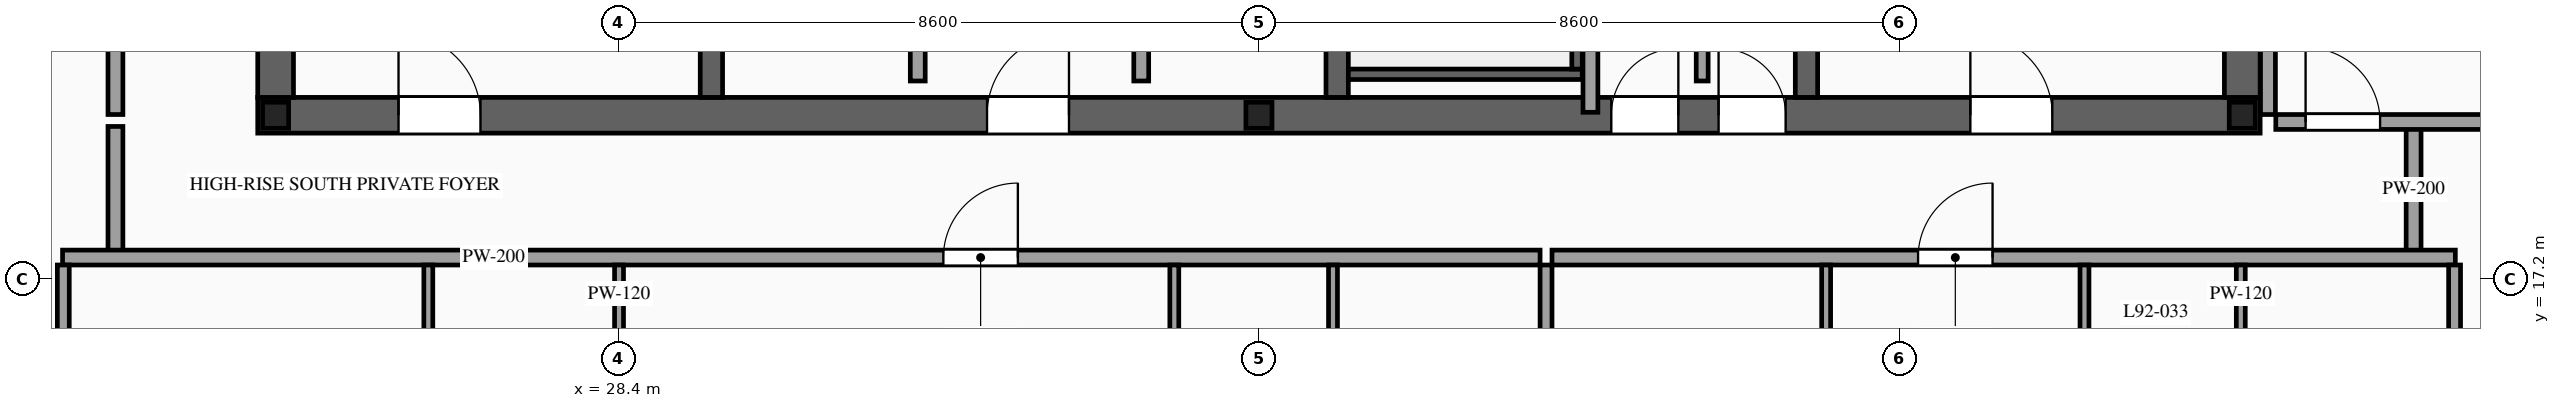
"""IFC4 building model, lengths in metres.
Left out: names, types, materials, properties, quantities, classifications, styles, units other than length and angle.
Written with IfcOpenShell. Run it as: python <this file> out.ifc"""

import sys

from ifc_helpers import new_model, si_unit, direction, frame, frame_2d, origin, origin_2d, place, context, subcontext, project, spatial, rectangle, i_section, extrude, source, transform, mapped, element, fill, save


model = new_model("IFC4")
c1 = context("Model", 3, precision=1e-05, world=origin(), true_north=direction((0.0, 1.0)))
c2 = subcontext(c1, "Body", "Model", "MODEL_VIEW")
j1 = project(units=[si_unit("LENGTHUNIT", "METRE"), si_unit("PLANEANGLEUNIT", "RADIAN")], contexts=[c1])
p1 = place(None, origin())
s1 = spatial("IfcSite", under=j1, at=p1, CompositionType="ELEMENT")
p2 = place(p1, origin())
s2 = spatial("IfcBuilding", under=s1, at=p2, CompositionType="ELEMENT")
p3 = place(p2, frame((0.0, 0.0, 343.2)))
s3 = spatial("IfcBuildingStorey", under=s2, at=p3, CompositionType="ELEMENT", Elevation=343.2)
p4 = place(p3, frame((23.56, 19.4, 0.0), z_axis=(0.0, 0.0, 1.0), x_axis=(1.0, 0.0, 0.0)))
e1 = element("IfcWall", 1, at=p4, inside=s3, PredefinedType="SHEAR", context=c2, shape_type="SweptSolid", body=[
    extrude(rectangle(XDim=26.88, YDim=0.48, at=frame_2d((13.44, 0.0))), origin(), (0.0, 0.0, 1.0), 4.0),
])
p5 = place(p4, frame((1.89, 0.0, 0.0)))
e2 = element("IfcOpeningElement", 2, at=p5, cuts=e1, PredefinedType="OPENING", context=c2, shape_type="SweptSolid", body=[
    extrude(rectangle(XDim=1.1, YDim=2.2, at=frame_2d((0.55, 1.1))), frame((0.0, 0.255, 0.0), z_axis=(0.0, -1.0, 0.0), x_axis=(1.0, 0.0, 0.0)), (0.0, 0.0, 1.0), 0.51),
])
p6 = place(p4, frame((9.79, 0.0, 0.0)))
e3 = element("IfcOpeningElement", 3, at=p6, cuts=e1, PredefinedType="OPENING", context=c2, shape_type="SweptSolid", body=[
    extrude(rectangle(XDim=1.1, YDim=2.2, at=frame_2d((0.55, 1.1))), frame((0.0, 0.255, 0.0), z_axis=(0.0, -1.0, 0.0), x_axis=(1.0, 0.0, 0.0)), (0.0, 0.0, 1.0), 0.51),
])
p7 = place(p4, frame((22.99, 0.0, 0.0)))
e4 = element("IfcOpeningElement", 4, at=p7, cuts=e1, PredefinedType="OPENING", context=c2, shape_type="SweptSolid", body=[
    extrude(rectangle(XDim=1.1, YDim=2.2, at=frame_2d((0.55, 1.1))), frame((0.0, 0.255, 0.0), z_axis=(0.0, -1.0, 0.0), x_axis=(1.0, 0.0, 0.0)), (0.0, 0.0, 1.0), 0.51),
])
p8 = place(p4, frame((19.61, 0.0, 0.0)))
e5 = element("IfcOpeningElement", 5, at=p8, cuts=e1, PredefinedType="OPENING", context=c2, shape_type="SweptSolid", body=[
    extrude(rectangle(XDim=0.9, YDim=2.15, at=frame_2d((0.45, 1.075))), frame((0.0, 0.255, 0.0), z_axis=(0.0, -1.0, 0.0), x_axis=(1.0, 0.0, 0.0)), (0.0, 0.0, 1.0), 0.51),
])
p9 = place(p4, frame((18.17, 0.0, 0.0)))
e6 = element("IfcOpeningElement", 6, at=p9, cuts=e1, PredefinedType="OPENING", context=c2, shape_type="SweptSolid", body=[
    extrude(rectangle(XDim=0.9, YDim=2.15, at=frame_2d((0.45, 1.075))), frame((0.0, 0.255, 0.0), z_axis=(0.0, -1.0, 0.0), x_axis=(1.0, 0.0, 0.0)), (0.0, 0.0, 1.0), 0.51),
])
m1 = source(origin(), c2, "Body", "SweptSolid", [
    extrude(rectangle(XDim=12.32, YDim=0.48, at=frame_2d((6.16, 0.0))), origin(), (0.0, 0.0, 1.0), 4.0),
])
for number, where, z_axis, x_axis in (
    (7, (23.8, 19.64, 0.0), (0.0, 0.0, 1.0), (0.0, 1.0, 0.0)),
    (8, (50.2, 19.64, 0.0), (0.0, 0.0, 1.0), (0.0, 1.0, 0.0)),
):
    element("IfcWall", number, at=place(p3, frame(where, z_axis=z_axis, x_axis=x_axis)), inside=s3, PredefinedType="SHEAR", context=c2, shape_type="MappedRepresentation", body=[
        mapped(m1, transform((0.0, 0.0, 0.0), scale=1.0)),
    ])
m2 = source(origin(), c2, "Body", "SweptSolid", [
    extrude(rectangle(XDim=12.32, YDim=0.3, at=frame_2d((6.16, 0.0))), origin(), (0.0, 0.0, 1.0), 4.0),
])
for number, where, z_axis, x_axis in (
    (9, (29.65, 19.64, 0.0), (0.0, 0.0, 1.0), (0.0, 1.0, 0.0)),
    (10, (38.05, 19.64, 0.0), (0.0, 0.0, 1.0), (0.0, 1.0, 0.0)),
):
    element("IfcWall", number, at=place(p3, frame(where, z_axis=z_axis, x_axis=x_axis)), inside=s3, PredefinedType="SOLIDWALL", context=c2, shape_type="MappedRepresentation", body=[
        mapped(m2, transform((0.0, 0.0, 0.0), scale=1.0)),
    ])
p10 = place(p3, frame((44.35, 19.64, 0.0), z_axis=(0.0, 0.0, 1.0), x_axis=(0.0, 1.0, 0.0)))
e11 = element("IfcWall", 11, at=p10, inside=s3, PredefinedType="SOLIDWALL", context=c2, shape_type="SweptSolid", body=[
    extrude(rectangle(XDim=12.32, YDim=0.3, at=frame_2d((6.16, 0.0))), origin(), (0.0, 0.0, 1.0), 4.0),
])
p11 = place(p10, frame((6.56, 0.0, 0.0)))
e12 = element("IfcOpeningElement", 12, at=p11, cuts=e11, PredefinedType="OPENING", context=c2, shape_type="SweptSolid", body=[
    extrude(rectangle(XDim=1.1, YDim=2.2, at=frame_2d((0.55, 1.1))), frame((0.0, 0.165, 0.0), z_axis=(0.0, -1.0, 0.0), x_axis=(1.0, 0.0, 0.0)), (0.0, 0.0, 1.0), 0.33),
])
p12 = place(p10, frame((8.66, 0.0, 0.0)))
e13 = element("IfcOpeningElement", 13, at=p12, cuts=e11, PredefinedType="OPENING", context=c2, shape_type="SweptSolid", body=[
    extrude(rectangle(XDim=1.1, YDim=2.2, at=frame_2d((0.55, 1.1))), frame((0.0, 0.165, 0.0), z_axis=(0.0, -1.0, 0.0), x_axis=(1.0, 0.0, 0.0)), (0.0, 0.0, 1.0), 0.33),
])
p13 = place(p10, frame((10.76, 0.0, 0.0)))
e14 = element("IfcOpeningElement", 14, at=p13, cuts=e11, PredefinedType="OPENING", context=c2, shape_type="SweptSolid", body=[
    extrude(rectangle(XDim=1.1, YDim=2.2, at=frame_2d((0.55, 1.1))), frame((0.0, 0.165, 0.0), z_axis=(0.0, -1.0, 0.0), x_axis=(1.0, 0.0, 0.0)), (0.0, 0.0, 1.0), 0.33),
])
m3 = source(origin(), c2, "Body", "SweptSolid", [
    extrude(i_section(OverallWidth=0.35, OverallDepth=0.35, WebThickness=0.012, FlangeThickness=0.019, at=origin_2d()), origin(), (0.0, 0.0, 1.0), 4.0),
])
for number, where, z_axis, x_axis in (
    (15, (23.8, 19.4, 0.0), (0.0, 0.0, 1.0), (1.0, 0.0, 0.0)),
    (16, (37.0, 19.4, 0.0), (0.0, 0.0, 1.0), (1.0, 0.0, 0.0)),
    (17, (50.2, 19.4, 0.0), (0.0, 0.0, 1.0), (1.0, 0.0, 0.0)),
):
    element("IfcColumn", number, at=place(p3, frame(where, z_axis=z_axis, x_axis=x_axis)), inside=s3, PredefinedType="COLUMN", context=c2, shape_type="MappedRepresentation", body=[
        mapped(m3, transform((0.0, 0.0, 0.0), scale=1.0)),
    ])
m4 = source(origin(), c2, "Body", "SweptSolid", [
    extrude(rectangle(XDim=3.14, YDim=0.14, at=frame_2d((1.57, 0.0))), origin(), (0.0, 0.0, 1.0), 3.76),
])
p14 = place(p3, frame((38.2, 19.95, 0.0), z_axis=(0.0, 0.0, 1.0), x_axis=(1.0, 0.0, 0.0)))
e18 = element("IfcWall", 18, at=p14, inside=s3, PredefinedType="SOLIDWALL", context=c2, shape_type="MappedRepresentation", body=[
    mapped(m4, transform((0.0, 0.0, 0.0), scale=1.0)),
])
m5 = source(origin(), c2, "Body", "SweptSolid", [
    extrude(rectangle(XDim=8.94, YDim=0.14, at=frame_2d((4.47, 0.0))), origin(), (0.0, 0.0, 1.0), 3.76),
])
p15 = place(p3, frame((41.27, 20.02, 0.0), z_axis=(0.0, 0.0, 1.0), x_axis=(0.0, 1.0, 0.0)))
e19 = element("IfcWall", 19, at=p15, inside=s3, PredefinedType="SOLIDWALL", context=c2, shape_type="MappedRepresentation", body=[
    mapped(m5, transform((0.0, 0.0, 0.0), scale=1.0)),
])
p16 = place(p3, frame((32.42, 19.86, 0.0), z_axis=(0.0, 0.0, 1.0), x_axis=(0.0, 1.0, 0.0)))
e20 = element("IfcWall", 20, at=p16, inside=s3, PredefinedType="PARTITIONING", context=c2, shape_type="SweptSolid", body=[
    extrude(rectangle(XDim=7.94, YDim=0.2, at=frame_2d((3.97, 0.0))), origin(), (0.0, 0.0, 1.0), 3.76),
])
p17 = place(p16, frame((3.52, 0.0, 0.0)))
e21 = element("IfcOpeningElement", 21, at=p17, cuts=e20, PredefinedType="OPENING", context=c2, shape_type="SweptSolid", body=[
    extrude(rectangle(XDim=0.9, YDim=2.15, at=frame_2d((0.45, 1.075))), frame((0.0, 0.115, 0.0), z_axis=(0.0, -1.0, 0.0), x_axis=(1.0, 0.0, 0.0)), (0.0, 0.0, 1.0), 0.23),
])
p18 = place(p3, frame((35.42, 19.86, 0.0), z_axis=(0.0, 0.0, 1.0), x_axis=(0.0, 1.0, 0.0)))
e22 = element("IfcWall", 22, at=p18, inside=s3, PredefinedType="PARTITIONING", context=c2, shape_type="SweptSolid", body=[
    extrude(rectangle(XDim=6.34, YDim=0.2, at=frame_2d((3.17, 0.0))), origin(), (0.0, 0.0, 1.0), 3.76),
])
p19 = place(p18, frame((2.72, 0.0, 0.0)))
e23 = element("IfcOpeningElement", 23, at=p19, cuts=e22, PredefinedType="OPENING", context=c2, shape_type="SweptSolid", body=[
    extrude(rectangle(XDim=0.9, YDim=2.15, at=frame_2d((0.45, 1.075))), frame((0.0, 0.115, 0.0), z_axis=(0.0, -1.0, 0.0), x_axis=(1.0, 0.0, 0.0)), (0.0, 0.0, 1.0), 0.23),
])
m6 = source(origin(), c2, "Body", "SweptSolid", [
    extrude(rectangle(XDim=1.34, YDim=0.16, at=frame_2d((0.67, 0.0))), origin(), (0.0, 0.0, 1.0), 3.76),
])
p20 = place(p3, frame((42.95, 19.86, 0.0), z_axis=(0.0, 0.0, 1.0), x_axis=(0.0, 1.0, 0.0)))
e24 = element("IfcWall", 24, at=p20, inside=s3, PredefinedType="PARTITIONING", context=c2, shape_type="MappedRepresentation", body=[
    mapped(m6, transform((0.0, 0.0, 0.0), scale=1.0)),
])
m7 = source(origin(), c2, "Body", "SweptSolid", [
    extrude(rectangle(XDim=6.06, YDim=0.2, at=frame_2d((3.03, 0.0))), origin(), (0.0, 0.0, 1.0), 3.76),
])
p21 = place(p3, frame((41.45, 19.44, 0.0), z_axis=(0.0, 0.0, 1.0), x_axis=(0.0, 1.0, 0.0)))
e25 = element("IfcWall", 25, at=p21, inside=s3, PredefinedType="PARTITIONING", context=c2, shape_type="MappedRepresentation", body=[
    mapped(m7, transform((0.0, 0.0, 0.0), scale=1.0)),
])
m8 = source(origin(), c2, "Body", "SweptSolid", [
    extrude(rectangle(XDim=1.7, YDim=0.2, at=frame_2d((0.85, 0.0))), origin(), (0.0, 0.0, 1.0), 3.76),
])
for number, where, z_axis, x_axis in (
    (26, (21.65, 17.55, 0.0), (0.0, 0.0, 1.0), (0.0, 1.0, 0.0)),
    (27, (52.5, 17.55, 0.0), (0.0, 0.0, 1.0), (0.0, 1.0, 0.0)),
):
    element("IfcWall", number, at=place(p3, frame(where, z_axis=z_axis, x_axis=x_axis)), inside=s3, PredefinedType="PARTITIONING", context=c2, shape_type="MappedRepresentation", body=[
        mapped(m8, transform((0.0, 0.0, 0.0), scale=1.0)),
    ])
p22 = place(p3, frame((20.94, 17.49, 0.0), z_axis=(0.0, 0.0, 1.0), x_axis=(1.0, 0.0, 0.0)))
e28 = element("IfcWall", 28, at=p22, inside=s3, PredefinedType="PARTITIONING", context=c2, shape_type="SweptSolid", body=[
    extrude(rectangle(XDim=19.834, YDim=0.2, at=frame_2d((9.917, 0.0))), origin(), (0.0, 0.0, 1.0), 3.76),
])
p23 = place(p22, frame((11.824, 0.0, 0.0)))
e29 = element("IfcOpeningElement", 29, at=p23, cuts=e28, PredefinedType="OPENING", context=c2, shape_type="SweptSolid", body=[
    extrude(rectangle(XDim=1.0, YDim=2.2, at=frame_2d((0.5, 1.1))), frame((0.0, 0.115, 0.0), z_axis=(0.0, -1.0, 0.0), x_axis=(1.0, 0.0, 0.0)), (0.0, 0.0, 1.0), 0.23),
])
m9 = source(origin(), c2, "Body", "SweptSolid", [
    extrude(rectangle(XDim=10.54, YDim=0.16, at=frame_2d((5.27, 0.0))), origin(), (0.0, 0.0, 1.0), 3.76),
])
p24 = place(p3, frame((40.854, 6.85, 0.0), z_axis=(0.0, 0.0, 1.0), x_axis=(0.0, 1.0, 0.0)))
e30 = element("IfcWall", 30, at=p24, inside=s3, PredefinedType="PARTITIONING", context=c2, shape_type="MappedRepresentation", body=[
    mapped(m9, transform((0.0, 0.0, 0.0), scale=1.0)),
])
m10 = source(origin(), c2, "Body", "SweptSolid", [
    extrude(rectangle(XDim=2.9, YDim=0.12, at=frame_2d((1.45, 0.0))), origin(), (0.0, 0.0, 1.0), 3.76),
])
p25 = place(p3, frame((25.85, 14.49, 0.0), z_axis=(0.0, 0.0, 1.0), x_axis=(0.0, 1.0, 0.0)))
e31 = element("IfcWall", 31, at=p25, inside=s3, PredefinedType="PARTITIONING", context=c2, shape_type="MappedRepresentation", body=[
    mapped(m10, transform((0.0, 0.0, 0.0), scale=1.0)),
])
p26 = place(p3, frame((28.41, 14.49, 0.0), z_axis=(0.0, 0.0, 1.0), x_axis=(0.0, 1.0, 0.0)))
e32 = element("IfcWall", 32, at=p26, inside=s3, PredefinedType="PARTITIONING", context=c2, shape_type="SweptSolid", body=[
    extrude(rectangle(XDim=2.9, YDim=0.12, at=frame_2d((1.45, 0.0))), origin(), (0.0, 0.0, 1.0), 3.76),
])
p27 = place(p26, frame((1.025, 0.0, 0.0)))
e33 = element("IfcOpeningElement", 33, at=p27, cuts=e32, PredefinedType="OPENING", context=c2, shape_type="SweptSolid", body=[
    extrude(rectangle(XDim=0.85, YDim=2.1, at=frame_2d((0.425, 1.05))), frame((0.0, 0.075, 0.0), z_axis=(0.0, -1.0, 0.0), x_axis=(1.0, 0.0, 0.0)), (0.0, 0.0, 1.0), 0.15),
])
for number, where, z_axis, x_axis in (
    (34, (37.994, 14.49, 0.0), (0.0, 0.0, 1.0), (0.0, 1.0, 0.0)),
    (35, (35.864, 14.49, 0.0), (0.0, 0.0, 1.0), (0.0, 1.0, 0.0)),
):
    element("IfcWall", number, at=place(p3, frame(where, z_axis=z_axis, x_axis=x_axis)), inside=s3, PredefinedType="PARTITIONING", context=c2, shape_type="MappedRepresentation", body=[
        mapped(m10, transform((0.0, 0.0, 0.0), scale=1.0)),
    ])
p28 = place(p3, frame((40.934, 17.49, 0.0), z_axis=(0.0, 0.0, 1.0), x_axis=(1.0, 0.0, 0.0)))
e36 = element("IfcWall", 36, at=p28, inside=s3, PredefinedType="PARTITIONING", context=c2, shape_type="SweptSolid", body=[
    extrude(rectangle(XDim=12.126, YDim=0.2, at=frame_2d((6.063, 0.0))), origin(), (0.0, 0.0, 1.0), 3.76),
])
p29 = place(p28, frame((4.914, 0.0, 0.0)))
e37 = element("IfcOpeningElement", 37, at=p29, cuts=e36, PredefinedType="OPENING", context=c2, shape_type="SweptSolid", body=[
    extrude(rectangle(XDim=1.0, YDim=2.2, at=frame_2d((0.5, 1.1))), frame((0.0, 0.115, 0.0), z_axis=(0.0, -1.0, 0.0), x_axis=(1.0, 0.0, 0.0)), (0.0, 0.0, 1.0), 0.23),
])
m11 = source(origin(), c2, "Body", "SweptSolid", [
    extrude(rectangle(XDim=10.39, YDim=0.16, at=frame_2d((5.195, 0.0))), origin(), (0.0, 0.0, 1.0), 3.76),
])
for number, where, z_axis, x_axis in (
    (38, (20.95, 7.0, 0.0), (0.0, 0.0, 1.0), (0.0, 1.0, 0.0)),
    (39, (53.05, 7.0, 0.0), (0.0, 0.0, 1.0), (0.0, 1.0, 0.0)),
):
    element("IfcWall", number, at=place(p3, frame(where, z_axis=z_axis, x_axis=x_axis)), inside=s3, PredefinedType="PARTITIONING", context=c2, shape_type="MappedRepresentation", body=[
        mapped(m11, transform((0.0, 0.0, 0.0), scale=1.0)),
    ])
p30 = place(p3, frame((44.614, 14.49, 0.0), z_axis=(0.0, 0.0, 1.0), x_axis=(0.0, 1.0, 0.0)))
e40 = element("IfcWall", 40, at=p30, inside=s3, PredefinedType="PARTITIONING", context=c2, shape_type="MappedRepresentation", body=[
    mapped(m10, transform((0.0, 0.0, 0.0), scale=1.0)),
])
p31 = place(p3, frame((50.18, 14.49, 0.0), z_axis=(0.0, 0.0, 1.0), x_axis=(0.0, 1.0, 0.0)))
e41 = element("IfcWall", 41, at=p31, inside=s3, PredefinedType="PARTITIONING", context=c2, shape_type="SweptSolid", body=[
    extrude(rectangle(XDim=2.9, YDim=0.12, at=frame_2d((1.45, 0.0))), origin(), (0.0, 0.0, 1.0), 3.305),
])
p32 = place(p31, frame((1.025, 0.0, 0.0)))
e42 = element("IfcOpeningElement", 42, at=p32, cuts=e41, PredefinedType="OPENING", context=c2, shape_type="SweptSolid", body=[
    extrude(rectangle(XDim=0.85, YDim=2.1, at=frame_2d((0.425, 1.05))), frame((0.0, 0.075, 0.0), z_axis=(0.0, -1.0, 0.0), x_axis=(1.0, 0.0, 0.0)), (0.0, 0.0, 1.0), 0.15),
])
p33 = place(p3, frame((48.082, 14.49, 0.0), z_axis=(0.0, 0.0, 1.0), x_axis=(0.0, 1.0, 0.0)))
e43 = element("IfcWall", 43, at=p33, inside=s3, PredefinedType="PARTITIONING", context=c2, shape_type="SweptSolid", body=[
    extrude(rectangle(XDim=2.9, YDim=0.12, at=frame_2d((1.45, 0.0))), origin(), (0.0, 0.0, 1.0), 3.76),
])
p34 = place(p33, frame((1.025, 0.0, 0.0)))
e44 = element("IfcOpeningElement", 44, at=p34, cuts=e43, PredefinedType="OPENING", context=c2, shape_type="SweptSolid", body=[
    extrude(rectangle(XDim=0.85, YDim=2.1, at=frame_2d((0.425, 1.05))), frame((0.0, 0.075, 0.0), z_axis=(0.0, -1.0, 0.0), x_axis=(1.0, 0.0, 0.0)), (0.0, 0.0, 1.0), 0.15),
])
p35 = place(p3, frame((21.65, 19.41, 0.0), z_axis=(0.0, 0.0, 1.0), x_axis=(0.0, 1.0, 0.0)))
e45 = element("IfcWall", 45, at=p35, inside=s3, PredefinedType="PARTITIONING", context=c2, shape_type="SweptSolid", body=[
    extrude(rectangle(XDim=12.78, YDim=0.2, at=frame_2d((6.39, 0.0))), origin(), (0.0, 0.0, 1.0), 3.76),
])
p36 = place(p35, frame((5.89, 0.0, 0.0)))
e46 = element("IfcOpeningElement", 46, at=p36, cuts=e45, PredefinedType="OPENING", context=c2, shape_type="SweptSolid", body=[
    extrude(rectangle(XDim=1.0, YDim=2.2, at=frame_2d((0.5, 1.1))), frame((0.0, 0.115, 0.0), z_axis=(0.0, -1.0, 0.0), x_axis=(1.0, 0.0, 0.0)), (0.0, 0.0, 1.0), 0.23),
])
p37 = place(p3, frame((50.65, 19.31, 0.0), z_axis=(0.0, 0.0, 1.0), x_axis=(1.0, 0.0, 0.0)))
e47 = element("IfcWall", 47, at=p37, inside=s3, PredefinedType="PARTITIONING", context=c2, shape_type="SweptSolid", body=[
    extrude(rectangle(XDim=5.3, YDim=0.2, at=frame_2d((2.65, 0.0))), origin(), (0.0, 0.0, 1.0), 3.305),
])
p38 = place(p37, frame((0.4, 0.0, 0.0)))
e48 = element("IfcOpeningElement", 48, at=p38, cuts=e47, PredefinedType="OPENING", context=c2, shape_type="SweptSolid", body=[
    extrude(rectangle(XDim=1.0, YDim=2.2, at=frame_2d((0.5, 1.1))), frame((0.0, 0.115, 0.0), z_axis=(0.0, -1.0, 0.0), x_axis=(1.0, 0.0, 0.0)), (0.0, 0.0, 1.0), 0.23),
])
m12 = source(origin(), c2, "Body", "SweptSolid", [
    extrude(rectangle(XDim=12.78, YDim=0.2, at=frame_2d((6.39, 0.0))), origin(), (0.0, 0.0, 1.0), 3.76),
])
p39 = place(p3, frame((50.545, 19.41, 0.0), z_axis=(0.0, 0.0, 1.0), x_axis=(0.0, 1.0, 0.0)))
e49 = element("IfcWall", 49, at=p39, inside=s3, PredefinedType="PARTITIONING", context=c2, shape_type="MappedRepresentation", body=[
    mapped(m12, transform((0.0, 0.0, 0.0), scale=1.0)),
])
m13 = source(origin(), c2, "Body", "SweptSolid", [
    extrude(rectangle(XDim=1.1, YDim=2.2, at=frame_2d((0.55, 1.1))), frame((0.0, 0.025, 0.0), z_axis=(0.0, -1.0, 0.0), x_axis=(1.0, 0.0, 0.0)), (0.0, 0.0, 1.0), 0.05),
])
p40 = place(p5, origin())
e50 = element("IfcDoor", 50, at=p40, inside=s3, OperationType="SINGLE_SWING_LEFT", PredefinedType="DOOR", context=c2, shape_type="MappedRepresentation", body=[
    mapped(m13, transform((0.0, 0.0, 0.0), scale=1.0)),
])
fill(e2, e50)
p41 = place(p6, origin())
e51 = element("IfcDoor", 51, at=p41, inside=s3, OperationType="SINGLE_SWING_RIGHT", PredefinedType="DOOR", context=c2, shape_type="MappedRepresentation", body=[
    mapped(m13, transform((0.0, 0.0, 0.0), scale=1.0)),
])
fill(e3, e51)
p42 = place(p7, origin())
e52 = element("IfcDoor", 52, at=p42, inside=s3, OperationType="SINGLE_SWING_LEFT", PredefinedType="DOOR", context=c2, shape_type="MappedRepresentation", body=[
    mapped(m13, transform((0.0, 0.0, 0.0), scale=1.0)),
])
fill(e4, e52)
m14 = source(origin(), c2, "Body", "SweptSolid", [
    extrude(rectangle(XDim=0.9, YDim=2.15, at=frame_2d((0.45, 1.075))), frame((0.0, 0.025, 0.0), z_axis=(0.0, -1.0, 0.0), x_axis=(1.0, 0.0, 0.0)), (0.0, 0.0, 1.0), 0.05),
])
p43 = place(p8, origin())
e53 = element("IfcDoor", 53, at=p43, inside=s3, OperationType="SINGLE_SWING_LEFT", PredefinedType="DOOR", context=c2, shape_type="MappedRepresentation", body=[
    mapped(m14, transform((0.0, 0.0, 0.0), scale=1.0)),
])
fill(e5, e53)
p44 = place(p9, origin())
e54 = element("IfcDoor", 54, at=p44, inside=s3, OperationType="SINGLE_SWING_RIGHT", PredefinedType="DOOR", context=c2, shape_type="MappedRepresentation", body=[
    mapped(m14, transform((0.0, 0.0, 0.0), scale=1.0)),
])
fill(e6, e54)
m15 = source(origin(), c2, "Body", "SweptSolid", [
    extrude(rectangle(XDim=1.0, YDim=2.2, at=frame_2d((0.5, 1.1))), frame((0.0, 0.025, 0.0), z_axis=(0.0, -1.0, 0.0), x_axis=(1.0, 0.0, 0.0)), (0.0, 0.0, 1.0), 0.05),
])
p45 = place(p23, origin())
e55 = element("IfcDoor", 55, at=p45, inside=s3, OperationType="SINGLE_SWING_RIGHT", PredefinedType="DOOR", context=c2, shape_type="MappedRepresentation", body=[
    mapped(m15, transform((0.0, 0.0, 0.0), scale=1.0)),
])
fill(e29, e55)
p46 = place(p29, origin())
e56 = element("IfcDoor", 56, at=p46, inside=s3, OperationType="SINGLE_SWING_RIGHT", PredefinedType="DOOR", context=c2, shape_type="MappedRepresentation", body=[
    mapped(m15, transform((0.0, 0.0, 0.0), scale=1.0)),
])
fill(e37, e56)
p47 = place(p38, origin())
e57 = element("IfcDoor", 57, at=p47, inside=s3, OperationType="SINGLE_SWING_LEFT", PredefinedType="DOOR", context=c2, shape_type="MappedRepresentation", body=[
    mapped(m15, transform((0.0, 0.0, 0.0), scale=1.0)),
])
fill(e48, e57)
save(model, sys.argv[1])
